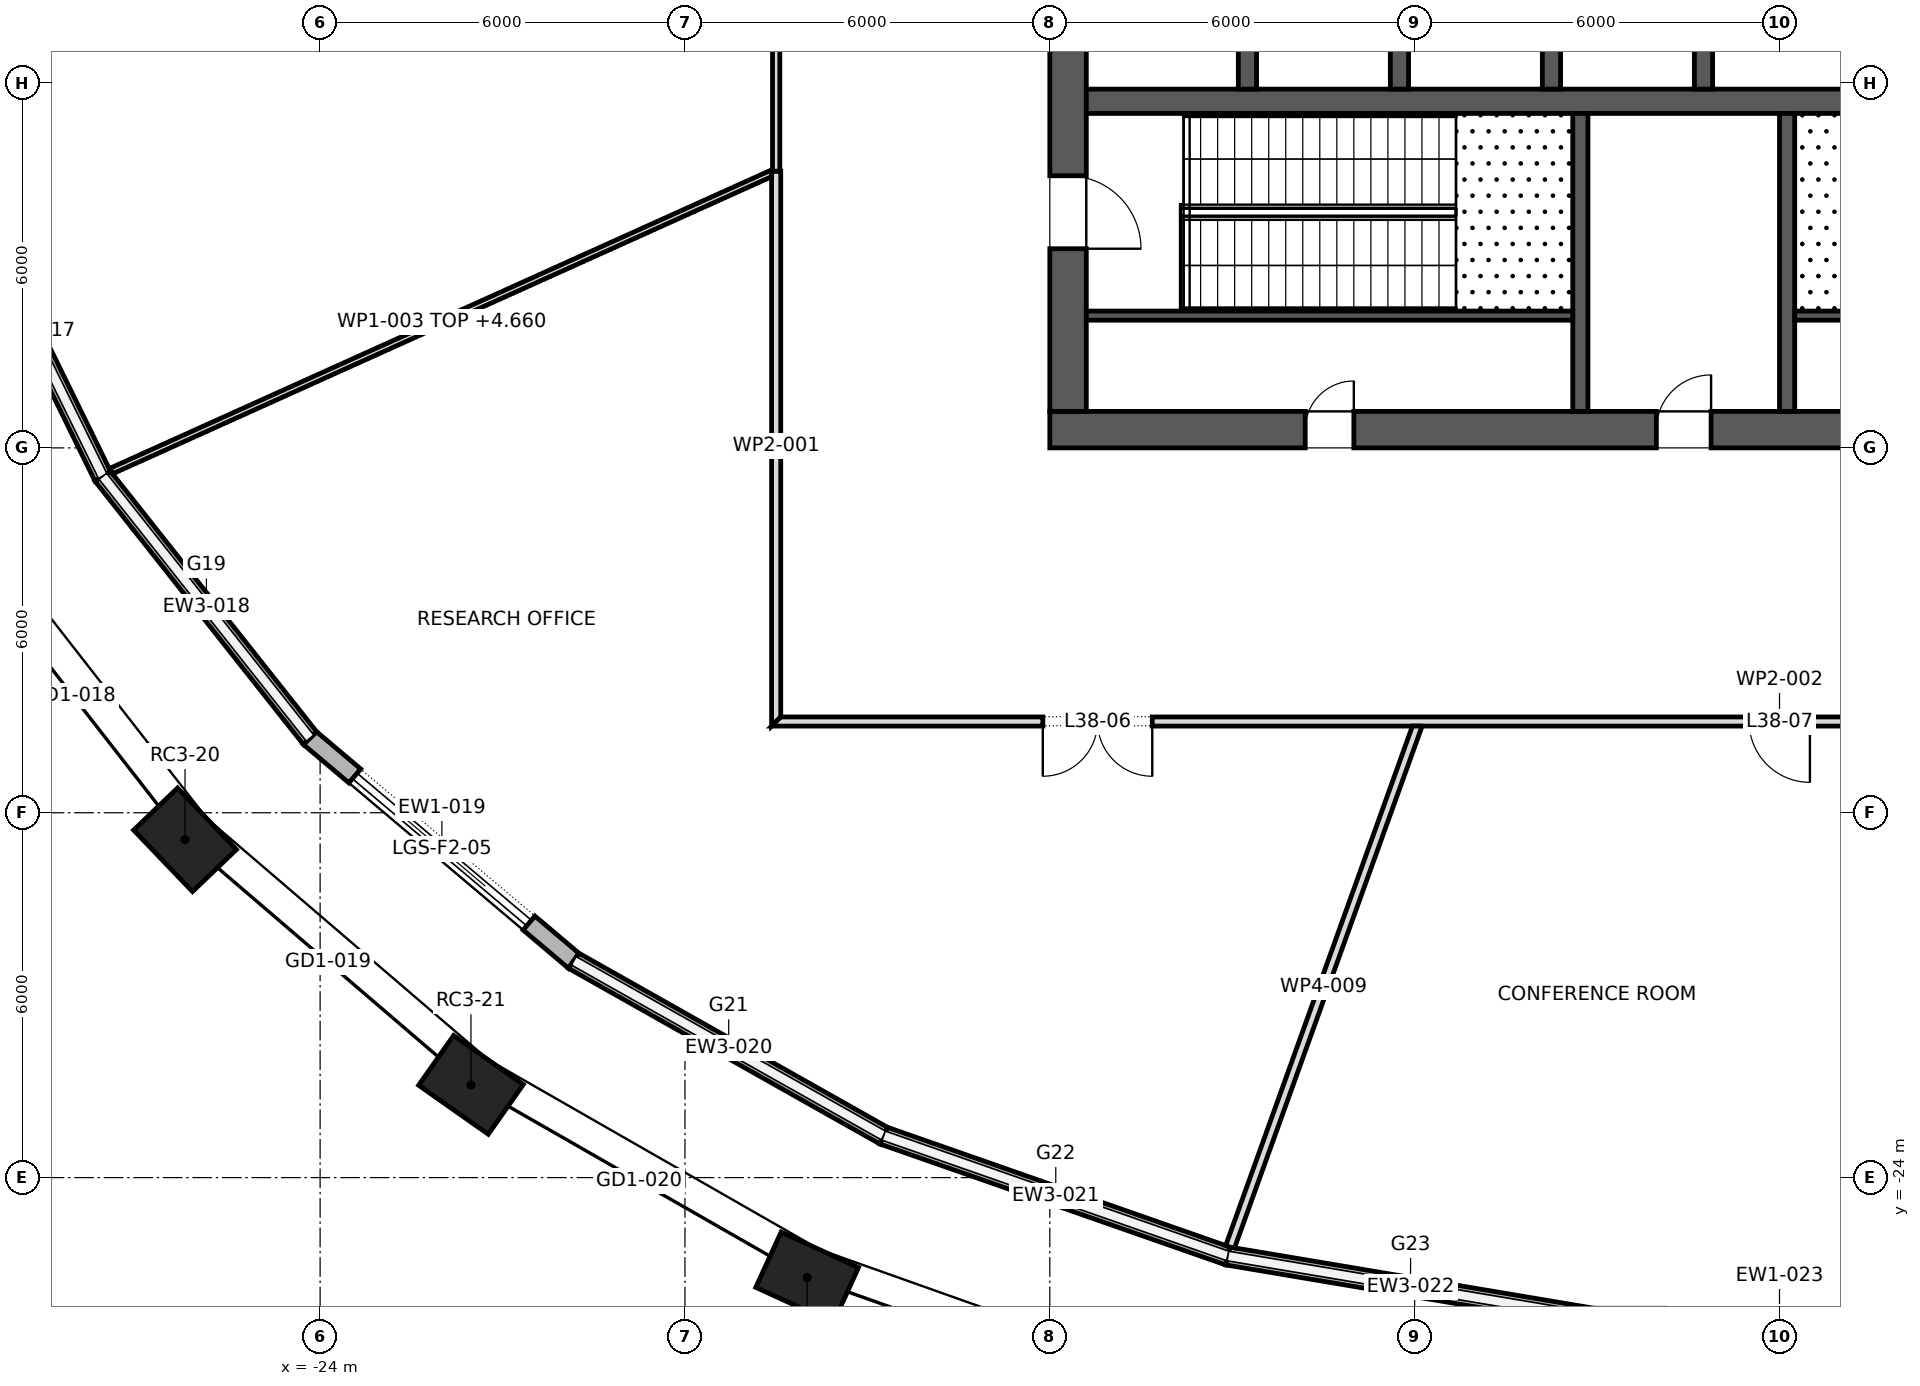
"""IFC4 building model, lengths in metres.
Left out: names, types, materials, properties, quantities, classifications, styles, units other than length and angle.
Written with IfcOpenShell. Run it as: python <this file> out.ifc"""

import sys

from ifc_helpers import new_model, si_unit, direction, frame, frame_2d, origin, origin_2d, place, context, subcontext, project, spatial, polyline, rectangle, outline, extrude, element, fill, save


model = new_model("IFC4")
c1 = context("Model", 3, precision=1e-05, world=origin(), true_north=direction((0.0, 1.0)))
c2 = subcontext(c1, "Body", "Model", "MODEL_VIEW")
j1 = project(units=[si_unit("LENGTHUNIT", "METRE"), si_unit("PLANEANGLEUNIT", "RADIAN")], contexts=[c1])
p1 = place(None, origin())
s1 = spatial("IfcSite", under=j1, at=p1, CompositionType="ELEMENT")
p2 = place(p1, origin())
s2 = spatial("IfcBuilding", under=s1, at=p2, CompositionType="ELEMENT")
p3 = place(p2, frame((0.0, 0.0, 167.5)))
s3 = spatial("IfcBuildingStorey", under=s2, at=p3, CompositionType="ELEMENT", Elevation=167.5)
for number, where, z_axis, x_axis in (
    (1, (-26.221, -18.445, 0.0), (0.0, 0.0, 1.0), (0.692, -0.722, 0.0)),
    (2, (-21.519, -22.475, 0.0), (0.0, 0.0, 1.0), (0.818, -0.575, 0.0)),
    (3, (-15.99, -25.642, 0.0), (0.0, 0.0, 1.0), (0.909, -0.417, 0.0)),
):
    element("IfcColumn", number, at=place(p3, frame(where, z_axis=z_axis, x_axis=x_axis)), inside=s3, PredefinedType="COLUMN", context=c2, shape_type="SweptSolid", body=[
        extrude(rectangle(XDim=1.4, YDim=1.0, at=origin_2d()), origin(), (0.0, 0.0, 1.0), 6.0),
    ])
p4 = place(p3, frame((-12.0, -11.7, 0.0), z_axis=(0.0, 0.0, 1.0), x_axis=(1.0, 0.0, 0.0)))
e4 = element("IfcWall", 4, at=p4, inside=s3, PredefinedType="SHEAR", context=c2, shape_type="SweptSolid", body=[
    extrude(rectangle(XDim=24.0, YDim=0.6, at=frame_2d((12.0, 0.0))), origin(), (0.0, 0.0, 1.0), 6.0),
])
p5 = place(p4, frame((9.975, 0.0, 0.0)))
e5 = element("IfcOpeningElement", 5, at=p5, cuts=e4, PredefinedType="OPENING", context=c2, shape_type="SweptSolid", body=[
    extrude(rectangle(XDim=0.9, YDim=2.1, at=frame_2d((0.45, 1.05))), frame((0.0, 0.312, 0.0), z_axis=(0.0, -1.0, 0.0), x_axis=(1.0, 0.0, 0.0)), (0.0, 0.0, 1.0), 0.624),
])
p6 = place(p4, frame((4.2, 0.0, 0.0)))
e6 = element("IfcOpeningElement", 6, at=p6, cuts=e4, PredefinedType="OPENING", context=c2, shape_type="SweptSolid", body=[
    extrude(rectangle(XDim=0.8, YDim=2.1, at=frame_2d((0.4, 1.05))), frame((0.0, 0.312, 0.0), z_axis=(0.0, -1.0, 0.0), x_axis=(1.0, 0.0, 0.0)), (0.0, 0.0, 1.0), 0.624),
])
p7 = place(p4, frame((13.8, 0.0, 0.0)))
e7 = element("IfcOpeningElement", 7, at=p7, cuts=e4, PredefinedType="OPENING", context=c2, shape_type="SweptSolid", body=[
    extrude(rectangle(XDim=0.8, YDim=2.1, at=frame_2d((0.4, 1.05))), frame((0.0, 0.312, 0.0), z_axis=(0.0, -1.0, 0.0), x_axis=(1.0, 0.0, 0.0)), (0.0, 0.0, 1.0), 0.624),
])
p8 = place(p4, frame((16.6, 0.0, 0.0)))
e8 = element("IfcOpeningElement", 8, at=p8, cuts=e4, PredefinedType="OPENING", context=c2, shape_type="SweptSolid", body=[
    extrude(rectangle(XDim=0.8, YDim=2.1, at=frame_2d((0.4, 1.05))), frame((0.0, 0.312, 0.0), z_axis=(0.0, -1.0, 0.0), x_axis=(1.0, 0.0, 0.0)), (0.0, 0.0, 1.0), 0.624),
])
p9 = place(p3, frame((-11.7, -11.4, 0.0), z_axis=(0.0, 0.0, 1.0), x_axis=(0.0, 1.0, 0.0)))
e9 = element("IfcWall", 9, at=p9, inside=s3, PredefinedType="SHEAR", context=c2, shape_type="SweptSolid", body=[
    extrude(rectangle(XDim=22.8, YDim=0.6, at=frame_2d((11.4, 0.0))), origin(), (0.0, 0.0, 1.0), 6.0),
])
p10 = place(p9, frame((10.2, 0.0, 0.0)))
e10 = element("IfcOpeningElement", 10, at=p10, cuts=e9, PredefinedType="OPENING", context=c2, shape_type="SweptSolid", body=[
    extrude(rectangle(XDim=2.4, YDim=2.1, at=frame_2d((1.2, 1.05))), frame((0.0, 0.312, 0.0), z_axis=(0.0, -1.0, 0.0), x_axis=(1.0, 0.0, 0.0)), (0.0, 0.0, 1.0), 0.624),
])
p11 = place(p9, frame((18.925, 0.0, 0.0)))
e11 = element("IfcOpeningElement", 11, at=p11, cuts=e9, PredefinedType="OPENING", context=c2, shape_type="SweptSolid", body=[
    extrude(rectangle(XDim=1.2, YDim=2.1, at=frame_2d((0.6, 1.05))), frame((0.0, 0.312, 0.0), z_axis=(0.0, -1.0, 0.0), x_axis=(1.0, 0.0, 0.0)), (0.0, 0.0, 1.0), 0.624),
])
p12 = place(p9, frame((2.675, 0.0, 0.0)))
e12 = element("IfcOpeningElement", 12, at=p12, cuts=e9, PredefinedType="OPENING", context=c2, shape_type="SweptSolid", body=[
    extrude(rectangle(XDim=1.2, YDim=2.1, at=frame_2d((0.6, 1.05))), frame((0.0, 0.312, 0.0), z_axis=(0.0, -1.0, 0.0), x_axis=(1.0, 0.0, 0.0)), (0.0, 0.0, 1.0), 0.624),
])
p13 = place(p3, frame((-11.4, -6.3, 0.0), z_axis=(0.0, 0.0, 1.0), x_axis=(1.0, 0.0, 0.0)))
e13 = element("IfcWall", 13, at=p13, inside=s3, PredefinedType="SHEAR", context=c2, shape_type="SweptSolid", body=[
    extrude(rectangle(XDim=22.8, YDim=0.4, at=frame_2d((11.4, 0.0))), origin(), (0.0, 0.0, 1.0), 6.0),
])
p14 = place(p13, frame((20.85, 0.0, 0.0)))
e14 = element("IfcOpeningElement", 14, at=p14, cuts=e13, PredefinedType="OPENING", context=c2, shape_type="SweptSolid", body=[
    extrude(rectangle(XDim=1.1, YDim=2.1, at=frame_2d((0.55, 1.05))), frame((0.0, 0.212, 0.0), z_axis=(0.0, -1.0, 0.0), x_axis=(1.0, 0.0, 0.0)), (0.0, 0.0, 1.0), 0.424),
])
for number, where, z_axis, x_axis in (
    (15, (-8.75, -6.1, 0.0), (0.0, 0.0, 1.0), (0.0, 1.0, 0.0)),
    (16, (-6.25, -6.1, 0.0), (0.0, 0.0, 1.0), (0.0, 1.0, 0.0)),
    (17, (-3.75, -6.1, 0.0), (0.0, 0.0, 1.0), (0.0, 1.0, 0.0)),
    (18, (-1.25, -6.1, 0.0), (0.0, 0.0, 1.0), (0.0, 1.0, 0.0)),
):
    element("IfcWall", number, at=place(p3, frame(where, z_axis=z_axis, x_axis=x_axis)), inside=s3, PredefinedType="SHEAR", context=c2, shape_type="SweptSolid", body=[
        extrude(rectangle(XDim=2.9, YDim=0.3, at=frame_2d((1.45, 0.0))), origin(), (0.0, 0.0, 1.0), 6.0),
    ])
p15 = place(p3, frame((-29.923, -7.678, 5.2), z_axis=(0.0, 0.0, 1.0), x_axis=(0.440444485575, -0.897779847806, 0.0)))
e19 = element("IfcWall", 19, at=p15, inside=s3, PredefinedType="STANDARD", context=c2, shape_type="SweptSolid", body=[
    extrude(outline(polyline([(-0.017, -0.15), (5.35, -0.15), (5.317, 0.15), (0.017, 0.15), (-0.017, -0.15)])), origin(), (0.0, 0.0, 1.0), 0.45),
])
p16 = place(p3, frame((-27.574, -12.467, 5.2), z_axis=(0.0, 0.0, 1.0), x_axis=(0.620577705153, -0.784144955902, 0.0)))
e20 = element("IfcWall", 20, at=p16, inside=s3, PredefinedType="STANDARD", context=c2, shape_type="SweptSolid", body=[
    extrude(outline(polyline([(-0.016, -0.15), (5.508, -0.15), (5.478, 0.15), (0.016, 0.15), (-0.016, -0.15)])), origin(), (0.0, 0.0, 1.0), 0.45),
])
p17 = place(p3, frame((-24.165, -16.774, 0.0), z_axis=(0.0, 0.0, 1.0), x_axis=(0.764076096085, -0.645126126732, 0.0)))
e21 = element("IfcWall", 21, at=p17, inside=s3, PredefinedType="STANDARD", context=c2, shape_type="SweptSolid", body=[
    extrude(outline(polyline([(-0.015, -0.15), (5.689, -0.15), (5.661, 0.15), (0.015, 0.15), (-0.015, -0.15)])), origin(), (0.0, 0.0, 1.0), 5.65),
])
p18 = place(p17, frame((0.962, 0.0, 0.0)))
e22 = element("IfcOpeningElement", 22, at=p18, cuts=e21, PredefinedType="OPENING", context=c2, shape_type="SweptSolid", body=[
    extrude(rectangle(XDim=3.75, YDim=5.2, at=frame_2d((1.875, 2.6))), frame((0.0, 0.162, 0.0), z_axis=(0.0, -1.0, 0.0), x_axis=(1.0, 0.0, 0.0)), (0.0, 0.0, 1.0), 0.324),
])
p19 = place(p3, frame((-19.829, -20.435, 5.2), z_axis=(0.0, 0.0, 1.0), x_axis=(0.870982130072, -0.491314694565, 0.0)))
e23 = element("IfcWall", 23, at=p19, inside=s3, PredefinedType="STANDARD", context=c2, shape_type="SweptSolid", body=[
    extrude(outline(polyline([(-0.014, -0.15), (5.865, -0.15), (5.838, 0.15), (0.014, 0.15), (-0.014, -0.15)])), origin(), (0.0, 0.0, 1.0), 0.45),
])
p20 = place(p3, frame((-14.732, -23.31, 5.2), z_axis=(0.0, 0.0, 1.0), x_axis=(0.943944636678, -0.330103806228, 0.0)))
e24 = element("IfcWall", 24, at=p20, inside=s3, PredefinedType="STANDARD", context=c2, shape_type="SweptSolid", body=[
    extrude(outline(polyline([(-0.013, -0.15), (6.01, -0.15), (5.985, 0.15), (0.013, 0.15), (-0.013, -0.15)])), origin(), (0.0, 0.0, 1.0), 0.45),
])
p21 = place(p3, frame((-9.071, -25.29, 5.2), z_axis=(0.0, 0.0, 1.0), x_axis=(0.98618955457, -0.165620537547, 0.0)))
e25 = element("IfcWall", 25, at=p21, inside=s3, PredefinedType="STANDARD", context=c2, shape_type="SweptSolid", body=[
    extrude(outline(polyline([(-0.013, -0.15), (6.105, -0.15), (6.08, 0.15), (0.013, 0.15), (-0.013, -0.15)])), origin(), (0.0, 0.0, 1.0), 0.45),
])
for number, where, z_axis, x_axis in (
    (26, (-3.275, -11.4, 0.0), (0.0, 0.0, 1.0), (0.0, 1.0, 0.0)),
    (27, (0.125, -11.4, 0.0), (0.0, 0.0, 1.0), (0.0, 1.0, 0.0)),
):
    element("IfcWall", number, at=place(p3, frame(where, z_axis=z_axis, x_axis=x_axis)), inside=s3, PredefinedType="SHEAR", context=c2, shape_type="SweptSolid", body=[
        extrude(rectangle(XDim=4.9, YDim=0.25, at=frame_2d((2.45, 0.0))), origin(), (0.0, 0.0, 1.0), 5.65),
    ])
for number, where, z_axis, x_axis in (
    (28, (-11.4, -9.825, 0.0), (0.0, 0.0, 1.0), (1.0, 0.0, 0.0)),
    (29, (0.25, -9.825, 0.0), (0.0, 0.0, 1.0), (1.0, 0.0, 0.0)),
):
    element("IfcWall", number, at=place(p3, frame(where, z_axis=z_axis, x_axis=x_axis)), inside=s3, PredefinedType="SHEAR", context=c2, shape_type="SweptSolid", body=[
        extrude(rectangle(XDim=8.0, YDim=0.15, at=frame_2d((4.0, 0.0))), origin(), (0.0, 0.0, 1.0), 5.65),
    ])
p22 = place(p3, frame((-16.5, -16.575, 0.0), z_axis=(0.0, 0.0, 1.0), x_axis=(0.0, 1.0, 0.0)))
e30 = element("IfcWall", 30, at=p22, inside=s3, PredefinedType="PARTITIONING", context=c2, shape_type="SweptSolid", body=[
    extrude(outline(polyline([(9.125, 0.075), (7.3, 0.075), (5.475, 0.075), (3.65, 0.075), (1.825, 0.075), (0.0, 0.075), (0.15, -0.075), (1.945, -0.075), (3.74, -0.075), (5.535, -0.075), (7.33, -0.075), (9.125, -0.075), (9.125, 0.075)])), origin(), (0.0, 0.0, 1.0), 5.65),
])
p23 = place(p3, frame((-16.575, -16.5, 0.0), z_axis=(0.0, 0.0, 1.0), x_axis=(1.0, 0.0, 0.0)))
e31 = element("IfcWall", 31, at=p23, inside=s3, PredefinedType="PARTITIONING", context=c2, shape_type="SweptSolid", body=[
    extrude(outline(polyline([(0.0, -0.075), (1.95, -0.075), (3.9, -0.075), (5.85, -0.075), (7.8, -0.075), (9.75, -0.075), (11.7, -0.075), (13.65, -0.075), (15.6, -0.075), (17.55, -0.075), (19.5, -0.075), (21.45, -0.075), (23.4, -0.075), (25.35, -0.075), (27.3, -0.075), (29.25, -0.075), (31.2, -0.075), (33.15, -0.075), (33.0, 0.075), (31.068, 0.075), (29.135, 0.075), (27.203, 0.075), (25.271, 0.075), (23.338, 0.075), (21.406, 0.075), (19.473, 0.075), (17.541, 0.075), (15.609, 0.075), (13.677, 0.075), (11.744, 0.075), (9.812, 0.075), (7.879, 0.075), (5.947, 0.075), (4.015, 0.075), (2.082, 0.075), (0.15, 0.075), (0.0, -0.075)])), origin(), (0.0, 0.0, 1.0), 5.65),
])
p24 = place(p23, frame((4.46, 0.0, 0.0)))
e32 = element("IfcOpeningElement", 32, at=p24, cuts=e31, PredefinedType="OPENING", context=c2, shape_type="SweptSolid", body=[
    extrude(rectangle(XDim=1.8, YDim=2.1, at=frame_2d((0.9, 1.05))), frame((0.0, 0.087, 0.0), z_axis=(0.0, -1.0, 0.0), x_axis=(1.0, 0.0, 0.0)), (0.0, 0.0, 1.0), 0.174),
])
p25 = place(p23, frame((16.075, 0.0, 0.0)))
e33 = element("IfcOpeningElement", 33, at=p25, cuts=e31, PredefinedType="OPENING", context=c2, shape_type="SweptSolid", body=[
    extrude(rectangle(XDim=1.0, YDim=2.1, at=frame_2d((0.5, 1.05))), frame((0.0, 0.087, 0.0), z_axis=(0.0, -1.0, 0.0), x_axis=(1.0, 0.0, 0.0)), (0.0, 0.0, 1.0), 0.174),
])
p26 = place(p23, frame((26.89, 0.0, 0.0)))
e34 = element("IfcOpeningElement", 34, at=p26, cuts=e31, PredefinedType="OPENING", context=c2, shape_type="SweptSolid", body=[
    extrude(rectangle(XDim=1.8, YDim=2.1, at=frame_2d((0.9, 1.05))), frame((0.0, 0.087, 0.0), z_axis=(0.0, -1.0, 0.0), x_axis=(1.0, 0.0, 0.0)), (0.0, 0.0, 1.0), 0.174),
])
p27 = place(p3, frame((-16.54, -7.468, 0.0), z_axis=(0.0, 0.0, 1.0), x_axis=(-0.911586306474, -0.411108751851, 0.0)))
e35 = element("IfcWall", 35, at=p27, inside=s3, PredefinedType="PARTITIONING", context=c2, shape_type="SweptSolid", body=[
    extrude(outline(polyline([(11.949, 0.05), (9.968, 0.05), (7.986, 0.05), (6.005, 0.05), (4.024, 0.05), (2.042, 0.05), (0.061, 0.05), (0.025, -0.031), (0.011, -0.025), (0.0, -0.049), (0.0, -0.05), (1.991, -0.05), (3.983, -0.05), (5.975, -0.05), (7.966, -0.05), (9.958, -0.05), (11.949, -0.05), (11.949, 0.05)])), origin(), (0.0, 0.0, 1.0), 4.66),
])
p28 = place(p3, frame((-16.5, -7.45, 0.0), z_axis=(0.0, 0.0, 1.0), x_axis=(0.0, 1.0, 0.0)))
e36 = element("IfcWall", 36, at=p28, inside=s3, PredefinedType="PARTITIONING", context=c2, shape_type="SweptSolid", body=[
    extrude(rectangle(XDim=8.82, YDim=0.12, at=frame_2d((4.41, 0.0))), origin(), (0.0, 0.0, 1.0), 5.65),
])
p29 = place(p28, frame((3.51, 0.0, 0.0)))
e37 = element("IfcOpeningElement", 37, at=p29, cuts=e36, PredefinedType="OPENING", context=c2, shape_type="SweptSolid", body=[
    extrude(rectangle(XDim=1.8, YDim=2.1, at=frame_2d((0.9, 1.05))), frame((0.0, 0.072, 0.0), z_axis=(0.0, -1.0, 0.0), x_axis=(1.0, 0.0, 0.0)), (0.0, 0.0, 1.0), 0.144),
])
p30 = place(p3, frame((-5.948, -16.55, 0.0), z_axis=(0.0, 0.0, 1.0), x_axis=(-0.338254589268, -0.941054638605, 0.0)))
e38 = element("IfcWall", 38, at=p30, inside=s3, PredefinedType="PARTITIONING", context=c2, shape_type="SweptSolid", body=[
    extrude(outline(polyline([(9.132, -0.075), (9.132, -0.062), (9.131, 0.003), (9.118, 0.075), (7.295, 0.075), (5.471, 0.075), (3.647, 0.075), (1.824, 0.075), (0.0, 0.075), (0.0, 0.074), (0.054, -0.075), (1.869, -0.075), (3.685, -0.075), (5.5, -0.075), (7.316, -0.075), (9.132, -0.075)])), origin(), (0.0, 0.0, 1.0), 4.88),
])
p31 = place(p18, origin())
e39 = element("IfcDoor", 39, at=p31, inside=s3, OperationType="DOUBLE_DOOR_SLIDING", PredefinedType="DOOR", context=c2, shape_type="SweptSolid", body=[
    extrude(rectangle(XDim=3.75, YDim=5.2, at=frame_2d((1.875, 2.6))), frame((0.0, 0.025, 0.0), z_axis=(0.0, -1.0, 0.0), x_axis=(1.0, 0.0, 0.0)), (0.0, 0.0, 1.0), 0.05),
])
fill(e22, e39)
p32 = place(p12, frame((1.2, 0.0, 0.0), z_axis=(0.0, 0.0, 1.0), x_axis=(-1.0, 0.0, 0.0)))
e40 = element("IfcDoor", 40, at=p32, inside=s3, OperationType="SINGLE_SWING_LEFT", PredefinedType="DOOR", context=c2, shape_type="SweptSolid", body=[
    extrude(rectangle(XDim=1.2, YDim=2.1, at=frame_2d((0.6, 1.05))), frame((0.0, 0.025, 0.0), z_axis=(0.0, -1.0, 0.0), x_axis=(1.0, 0.0, 0.0)), (0.0, 0.0, 1.0), 0.05),
])
fill(e12, e40)
p33 = place(p5, origin())
e41 = element("IfcDoor", 41, at=p33, inside=s3, OperationType="SINGLE_SWING_LEFT", PredefinedType="DOOR", context=c2, shape_type="SweptSolid", body=[
    extrude(rectangle(XDim=0.9, YDim=2.1, at=frame_2d((0.45, 1.05))), frame((0.0, 0.025, 0.0), z_axis=(0.0, -1.0, 0.0), x_axis=(1.0, 0.0, 0.0)), (0.0, 0.0, 1.0), 0.05),
])
fill(e5, e41)
p34 = place(p6, origin())
e42 = element("IfcDoor", 42, at=p34, inside=s3, OperationType="SINGLE_SWING_LEFT", PredefinedType="DOOR", context=c2, shape_type="SweptSolid", body=[
    extrude(rectangle(XDim=0.8, YDim=2.1, at=frame_2d((0.4, 1.05))), frame((0.0, 0.025, 0.0), z_axis=(0.0, -1.0, 0.0), x_axis=(1.0, 0.0, 0.0)), (0.0, 0.0, 1.0), 0.05),
])
fill(e6, e42)
p35 = place(p24, frame((1.8, 0.0, 0.0), z_axis=(0.0, 0.0, 1.0), x_axis=(-1.0, 0.0, 0.0)))
e43 = element("IfcDoor", 43, at=p35, inside=s3, OperationType="DOUBLE_DOOR_SINGLE_SWING", PredefinedType="DOOR", context=c2, shape_type="SweptSolid", body=[
    extrude(rectangle(XDim=1.8, YDim=2.1, at=frame_2d((0.9, 1.05))), frame((0.0, 0.025, 0.0), z_axis=(0.0, -1.0, 0.0), x_axis=(1.0, 0.0, 0.0)), (0.0, 0.0, 1.0), 0.05),
])
fill(e32, e43)
p36 = place(p25, frame((1.0, 0.0, 0.0), z_axis=(0.0, 0.0, 1.0), x_axis=(-1.0, 0.0, 0.0)))
e44 = element("IfcDoor", 44, at=p36, inside=s3, OperationType="SINGLE_SWING_RIGHT", PredefinedType="DOOR", context=c2, shape_type="SweptSolid", body=[
    extrude(rectangle(XDim=1.0, YDim=2.1, at=frame_2d((0.5, 1.05))), frame((0.0, 0.025, 0.0), z_axis=(0.0, -1.0, 0.0), x_axis=(1.0, 0.0, 0.0)), (0.0, 0.0, 1.0), 0.05),
])
fill(e33, e44)
save(model, sys.argv[1])
